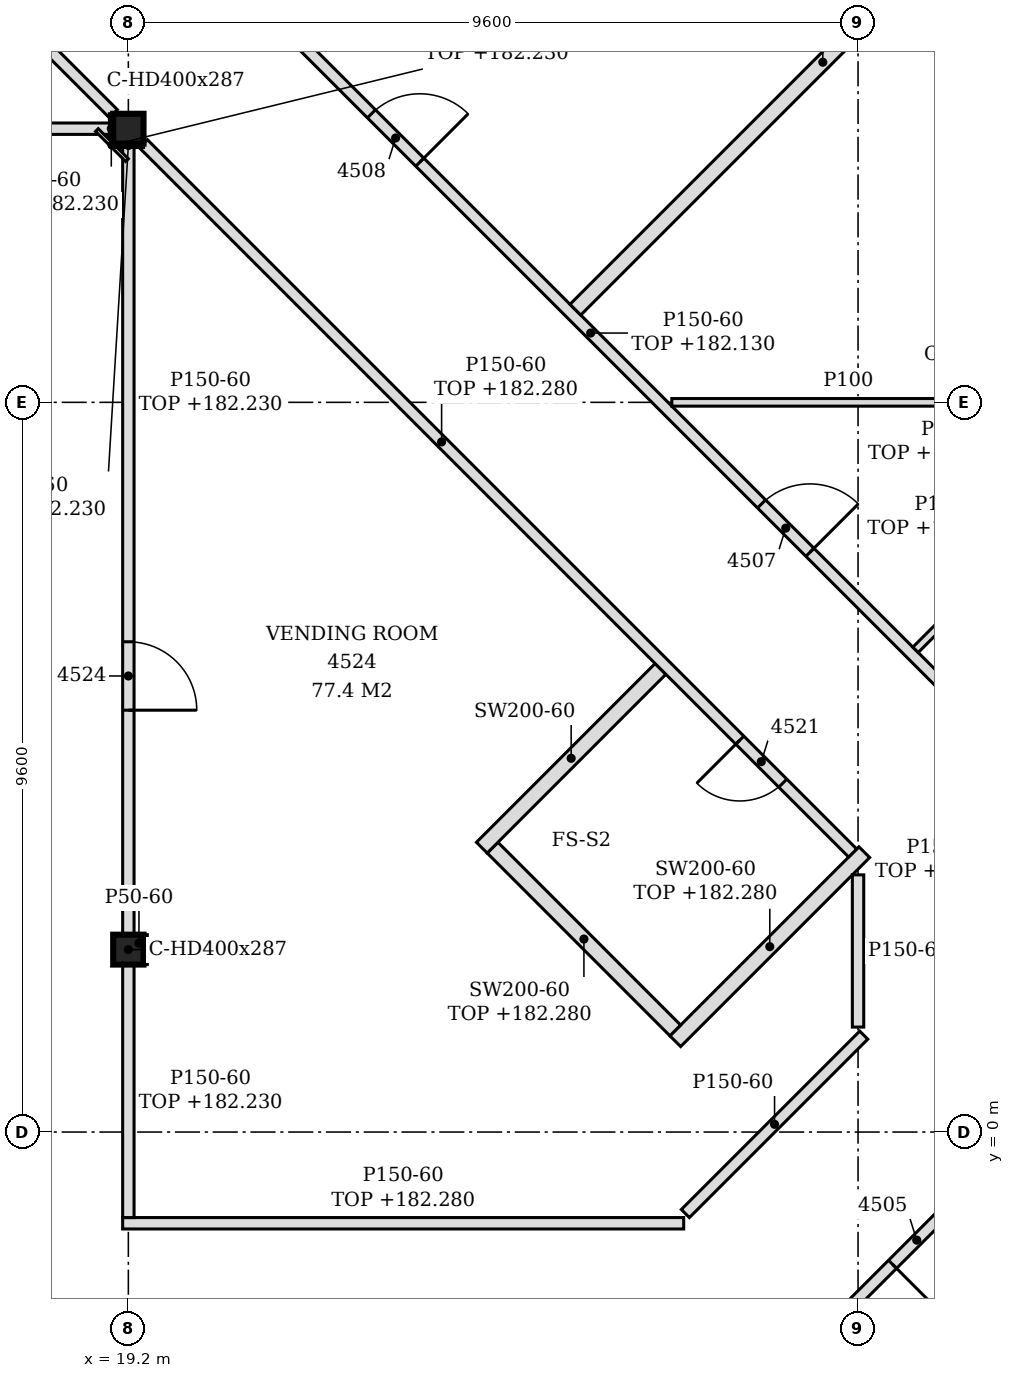
"""IFC4 building model, lengths in metres.
Left out: names, types, materials, properties, quantities, classifications, styles, units other than length and angle.
Written with IfcOpenShell. Run it as: python <this file> out.ifc"""

import sys

from ifc_helpers import new_model, si_unit, direction, frame, frame_2d, origin, origin_2d, place, context, subcontext, project, spatial, polyline, rectangle, i_section, outline, extrude, element, fill, save


model = new_model("IFC4")
c1 = context("Model", 3, precision=1e-05, world=origin(), true_north=direction((0.0, 1.0)))
c2 = subcontext(c1, "Body", "Model", "MODEL_VIEW")
j1 = project(units=[si_unit("LENGTHUNIT", "METRE"), si_unit("PLANEANGLEUNIT", "RADIAN")], contexts=[c1])
p1 = place(None, origin())
s1 = spatial("IfcSite", under=j1, at=p1, CompositionType="ELEMENT")
p2 = place(p1, origin())
s2 = spatial("IfcBuilding", under=s1, at=p2, CompositionType="ELEMENT")
p3 = place(p2, frame((0.0, 0.0, 179.4)))
s3 = spatial("IfcBuildingStorey", under=s2, at=p3, CompositionType="ELEMENT", Elevation=179.4)
for number, where, z_axis, x_axis in (
    (1, (19.2, 2.4, -0.15), (0.0, 0.0, 1.0), (1.0, 0.0, 0.0)),
    (2, (19.2, 13.2, -0.15), (0.0, 0.0, 1.0), (1.0, 0.0, 0.0)),
):
    element("IfcColumn", number, at=place(p3, frame(where, z_axis=z_axis, x_axis=x_axis)), inside=s3, PredefinedType="COLUMN", context=c2, shape_type="SweptSolid", body=[
        extrude(i_section(OverallWidth=0.399, OverallDepth=0.393, WebThickness=0.023, FlangeThickness=0.037, FilletRadius=0.015, at=origin_2d()), origin(), (0.0, 0.0, 1.0), 3.6),
    ])
p4 = place(p3, frame((20.297, -10.697, 0.0), z_axis=(0.0, 0.0, 1.0), x_axis=(0.707098631462, 0.707114930817, 0.0)))
e3 = element("IfcWall", 3, at=p4, inside=s3, PredefinedType="PARTITIONING", context=c2, shape_type="SweptSolid", body=[
    extrude(rectangle(XDim=14.979, YDim=0.15, at=frame_2d((7.489, 0.0))), origin(), (0.0, 0.0, 1.0), 2.88),
])
p5 = place(p4, frame((0.561, 0.0, 0.0)))
e4 = element("IfcOpeningElement", 4, at=p5, cuts=e3, PredefinedType="OPENING", context=c2, shape_type="SweptSolid", body=[
    extrude(rectangle(XDim=0.9, YDim=2.1, at=frame_2d((0.45, 1.05))), frame((0.0, 0.085, 0.0), z_axis=(0.0, -1.0, 0.0), x_axis=(1.0, 0.0, 0.0)), (0.0, 0.0, 1.0), 0.17),
])
p6 = place(p4, frame((4.986, 0.0, 0.0)))
e5 = element("IfcOpeningElement", 5, at=p6, cuts=e3, PredefinedType="OPENING", context=c2, shape_type="SweptSolid", body=[
    extrude(rectangle(XDim=0.9, YDim=2.1, at=frame_2d((0.45, 1.05))), frame((0.0, 0.085, 0.0), z_axis=(0.0, -1.0, 0.0), x_axis=(1.0, 0.0, 0.0)), (0.0, 0.0, 1.0), 0.17),
])
p7 = place(p4, frame((12.667, 0.0, 0.0)))
e6 = element("IfcOpeningElement", 6, at=p7, cuts=e3, PredefinedType="OPENING", context=c2, shape_type="SweptSolid", body=[
    extrude(rectangle(XDim=0.9, YDim=2.1, at=frame_2d((0.45, 1.05))), frame((0.0, 0.085, 0.0), z_axis=(0.0, -1.0, 0.0), x_axis=(1.0, 0.0, 0.0)), (0.0, 0.0, 1.0), 0.17),
])
p8 = place(p3, frame((19.125, -1.2, 0.0), z_axis=(0.0, 0.0, 1.0), x_axis=(1.0, 0.0, 0.0)))
e7 = element("IfcWall", 7, at=p8, inside=s3, PredefinedType="PARTITIONING", context=c2, shape_type="SweptSolid", body=[
    extrude(outline(polyline([(0.0, 0.0), (7.381, 0.0), (7.381, 2.88), (0.225, 2.88), (0.223, 2.83), (0.0, 2.83), (0.0, 0.0)])), frame((0.0, 0.075, 0.0), z_axis=(0.0, -1.0, 0.0), x_axis=(1.0, 0.0, 0.0)), (0.0, 0.0, 1.0), 0.15),
])
p9 = place(p3, frame((19.2, -1.125, 0.0), z_axis=(0.0, 0.0, 1.0), x_axis=(0.0, 1.0, 0.0)))
e8 = element("IfcWall", 8, at=p9, inside=s3, PredefinedType="PARTITIONING", context=c2, shape_type="SweptSolid", body=[
    extrude(rectangle(XDim=3.329, YDim=0.15, at=frame_2d((1.664, 0.0))), origin(), (0.0, 0.0, 1.0), 2.83),
])
p10 = place(p3, frame((26.528, -1.072, 0.0), z_axis=(0.0, 0.0, 1.0), x_axis=(0.707106781187, 0.707106781187, 0.0)))
e9 = element("IfcWall", 9, at=p10, inside=s3, PredefinedType="PARTITIONING", context=c2, shape_type="SweptSolid", body=[
    extrude(rectangle(XDim=3.319, YDim=0.15, at=frame_2d((1.66, 0.0))), origin(), (0.0, 0.0, 1.0), 3.45),
])
p11 = place(p3, frame((26.395, 1.195, 0.0), z_axis=(0.0, 0.0, 1.0), x_axis=(0.707106781187, 0.707106781187, 0.0)))
e10 = element("IfcWall", 10, at=p11, inside=s3, PredefinedType="PARTITIONING", context=c2, shape_type="SweptSolid", body=[
    extrude(rectangle(XDim=3.517, YDim=0.2, at=frame_2d((1.759, 0.0))), origin(), (0.0, 0.0, 1.0), 2.88),
])
p12 = place(p3, frame((26.395, 1.337, 0.0), z_axis=(0.0, 0.0, 1.0), x_axis=(-0.706963147882, 0.707250385321, 0.0)))
e11 = element("IfcWall", 11, at=p12, inside=s3, PredefinedType="PARTITIONING", context=c2, shape_type="SweptSolid", body=[
    extrude(rectangle(XDim=3.4, YDim=0.2, at=frame_2d((1.7, 0.0))), origin(), (0.0, 0.0, 1.0), 2.88),
])
p13 = place(p3, frame((28.8, 1.381, 0.0), z_axis=(0.0, 0.0, 1.0), x_axis=(0.0, 1.0, 0.0)))
e12 = element("IfcWall", 12, at=p13, inside=s3, PredefinedType="PARTITIONING", context=c2, shape_type="SweptSolid", body=[
    extrude(outline(polyline([(0.0, 0.0), (2.002, 0.0), (2.002, 2.88), (1.964, 2.88), (1.962, 3.45), (0.0, 3.45), (0.0, 0.0)])), frame((0.0, 0.075, 0.0), z_axis=(0.0, -1.0, 0.0), x_axis=(1.0, 0.0, 0.0)), (0.0, 0.0, 1.0), 0.15),
])
p14 = place(p3, frame((19.2, 2.596, 0.0), z_axis=(0.0, 0.0, 1.0), x_axis=(0.0, 1.0, 0.0)))
e13 = element("IfcWall", 13, at=p14, inside=s3, PredefinedType="PARTITIONING", context=c2, shape_type="SweptSolid", body=[
    extrude(rectangle(XDim=10.407, YDim=0.15, at=frame_2d((5.204, 0.0))), origin(), (0.0, 0.0, 1.0), 2.83),
])
p15 = place(p14, frame((2.954, 0.0, 0.0)))
e14 = element("IfcOpeningElement", 14, at=p15, cuts=e13, PredefinedType="OPENING", context=c2, shape_type="SweptSolid", body=[
    extrude(rectangle(XDim=0.9, YDim=2.1, at=frame_2d((0.45, 1.05))), frame((0.0, 0.085, 0.0), z_axis=(0.0, -1.0, 0.0), x_axis=(1.0, 0.0, 0.0)), (0.0, 0.0, 1.0), 0.17),
])
p16 = place(p3, frame((23.85, 3.741, 0.0), z_axis=(0.0, 0.0, 1.0), x_axis=(0.706923198159, 0.707290316563, 0.0)))
e15 = element("IfcWall", 15, at=p16, inside=s3, PredefinedType="PARTITIONING", context=c2, shape_type="SweptSolid", body=[
    extrude(rectangle(XDim=3.325, YDim=0.2, at=frame_2d((1.663, 0.0))), origin(), (0.0, 0.0, 1.0), 3.45),
])
p17 = place(p3, frame((28.729, 3.671, 0.0), z_axis=(0.0, 0.0, 1.0), x_axis=(-0.707106781187, 0.707106781187, 0.0)))
e16 = element("IfcWall", 16, at=p17, inside=s3, PredefinedType="PARTITIONING", context=c2, shape_type="SweptSolid", body=[
    extrude(rectangle(XDim=13.197, YDim=0.15, at=frame_2d((6.598, 0.0))), origin(), (0.0, 0.0, 1.0), 2.88),
])
p18 = place(p17, frame((1.3, 0.0, 0.0)))
e17 = element("IfcOpeningElement", 17, at=p18, cuts=e16, PredefinedType="OPENING", context=c2, shape_type="SweptSolid", body=[
    extrude(rectangle(XDim=0.8, YDim=2.1, at=frame_2d((0.4, 1.05))), frame((0.0, 0.085, 0.0), z_axis=(0.0, -1.0, 0.0), x_axis=(1.0, 0.0, 0.0)), (0.0, 0.0, 1.0), 0.17),
])
p19 = place(p3, frame((31.072, 4.722, 0.0), z_axis=(0.0, 0.0, 1.0), x_axis=(-0.707101007496, 0.70711255483, 0.0)))
e18 = element("IfcWall", 18, at=p19, inside=s3, PredefinedType="PARTITIONING", context=c2, shape_type="SweptSolid", body=[
    extrude(rectangle(XDim=21.143, YDim=0.15, at=frame_2d((10.571, 0.0))), origin(), (0.0, 0.0, 1.0), 2.73),
])
p20 = place(p19, frame((4.108, 0.0, 0.0)))
e19 = element("IfcOpeningElement", 19, at=p20, cuts=e18, PredefinedType="OPENING", context=c2, shape_type="SweptSolid", body=[
    extrude(rectangle(XDim=0.9, YDim=2.1, at=frame_2d((0.45, 1.05))), frame((0.0, 0.085, 0.0), z_axis=(0.0, -1.0, 0.0), x_axis=(1.0, 0.0, 0.0)), (0.0, 0.0, 1.0), 0.17),
])
p21 = place(p19, frame((11.367, 0.0, 0.0)))
e20 = element("IfcOpeningElement", 20, at=p21, cuts=e18, PredefinedType="OPENING", context=c2, shape_type="SweptSolid", body=[
    extrude(rectangle(XDim=0.9, YDim=2.1, at=frame_2d((0.45, 1.05))), frame((0.0, 0.085, 0.0), z_axis=(0.0, -1.0, 0.0), x_axis=(1.0, 0.0, 0.0)), (0.0, 0.0, 1.0), 0.17),
])
p22 = place(p19, frame((16.556, 0.0, 0.0)))
e21 = element("IfcOpeningElement", 21, at=p22, cuts=e18, PredefinedType="OPENING", context=c2, shape_type="SweptSolid", body=[
    extrude(rectangle(XDim=0.9, YDim=2.1, at=frame_2d((0.45, 1.05))), frame((0.0, 0.085, 0.0), z_axis=(0.0, -1.0, 0.0), x_axis=(1.0, 0.0, 0.0)), (0.0, 0.0, 1.0), 0.17),
])
p23 = place(p3, frame((29.556, 6.344, 0.0), z_axis=(0.0, 0.0, 1.0), x_axis=(0.707158179099, 0.707055379538, 0.0)))
e22 = element("IfcWall", 22, at=p23, inside=s3, PredefinedType="PARTITIONING", context=c2, shape_type="SweptSolid", body=[
    extrude(rectangle(XDim=2.375, YDim=0.1, at=frame_2d((1.188, 0.0))), origin(), (0.0, 0.0, 1.0), 2.93),
])
p24 = place(p3, frame((26.35, 9.6, 0.0), z_axis=(0.0, 0.0, 1.0), x_axis=(1.0, 0.0, 0.0)))
e23 = element("IfcWall", 23, at=p24, inside=s3, PredefinedType="PARTITIONING", context=c2, shape_type="SweptSolid", body=[
    extrude(rectangle(XDim=4.646, YDim=0.1, at=frame_2d((2.323, 0.0))), origin(), (0.0, 0.0, 1.0), 3.45),
])
p25 = place(p3, frame((25.081, 10.819, 0.0), z_axis=(0.0, 0.0, 1.0), x_axis=(0.707106781187, 0.707106781187, 0.0)))
e24 = element("IfcWall", 24, at=p25, inside=s3, PredefinedType="PARTITIONING", context=c2, shape_type="SweptSolid", body=[
    extrude(rectangle(XDim=9.208, YDim=0.2, at=frame_2d((4.604, 0.0))), origin(), (0.0, 0.0, 1.0), 2.88),
])
p26 = place(p3, frame((7.399, 13.2, 0.0), z_axis=(0.0, 0.0, 1.0), x_axis=(1.0, 0.0, 0.0)))
e25 = element("IfcWall", 25, at=p26, inside=s3, PredefinedType="PARTITIONING", context=c2, shape_type="SweptSolid", body=[
    extrude(rectangle(XDim=11.601, YDim=0.15, at=frame_2d((5.801, 0.0))), origin(), (0.0, 0.0, 1.0), 2.83),
])
p27 = place(p26, frame((5.351, 0.0, 0.0)))
e26 = element("IfcOpeningElement", 26, at=p27, cuts=e25, PredefinedType="OPENING", context=c2, shape_type="SweptSolid", body=[
    extrude(rectangle(XDim=0.9, YDim=2.1, at=frame_2d((0.45, 1.05))), frame((0.0, 0.085, 0.0), z_axis=(0.0, -1.0, 0.0), x_axis=(1.0, 0.0, 0.0)), (0.0, 0.0, 1.0), 0.17),
])
p28 = place(p3, frame((19.002, 13.398, 0.0), z_axis=(0.0, 0.0, 1.0), x_axis=(-0.707106781187, 0.707106781187, 0.0)))
e27 = element("IfcWall", 27, at=p28, inside=s3, PredefinedType="PARTITIONING", context=c2, shape_type="SweptSolid", body=[
    extrude(rectangle(XDim=5.479, YDim=0.15, at=frame_2d((2.739, 0.0))), origin(), (0.0, 0.0, 1.0), 3.45),
])
p29 = place(p3, frame((19.425, 2.204, 0.0), z_axis=(0.0, 0.0, 1.0), x_axis=(0.0, 1.0, 0.0)))
e28 = element("IfcWall", 28, at=p29, inside=s3, PredefinedType="PARTITIONING", context=c2, shape_type="SweptSolid", body=[
    extrude(rectangle(XDim=0.393, YDim=0.05, at=frame_2d((0.196, 0.0))), origin(), (0.0, 0.0, 1.0), 3.45),
])
p30 = place(p3, frame((18.976, 13.003, 0.0), z_axis=(0.0, 0.0, 1.0), x_axis=(0.0, 1.0, 0.0)))
e29 = element("IfcWall", 29, at=p30, inside=s3, PredefinedType="PARTITIONING", context=c2, shape_type="SweptSolid", body=[
    extrude(rectangle(XDim=0.393, YDim=0.05, at=frame_2d((0.197, 0.0))), origin(), (0.0, 0.0, 1.0), 2.83),
])
p31 = place(p3, frame((19.182, 12.786, 0.0), z_axis=(0.0, 0.0, 1.0), x_axis=(-0.707106781187, 0.707106781187, 0.0)))
e30 = element("IfcWall", 30, at=p31, inside=s3, PredefinedType="PARTITIONING", context=c2, shape_type="SweptSolid", body=[
    extrude(rectangle(XDim=0.56, YDim=0.05, at=frame_2d((0.28, 0.0))), origin(), (0.0, 0.0, 1.0), 2.83),
])
p32 = place(p3, frame((19.0, 12.979, 0.0), z_axis=(0.0, 0.0, 1.0), x_axis=(1.0, 0.0, 0.0)))
e31 = element("IfcWall", 31, at=p32, inside=s3, PredefinedType="PARTITIONING", context=c2, shape_type="SweptSolid", body=[
    extrude(rectangle(XDim=0.399, YDim=0.05, at=frame_2d((0.199, 0.0))), origin(), (0.0, 0.0, 1.0), 2.83),
])
p33 = place(p7, frame((0.9, 0.0, 0.0), z_axis=(0.0, 0.0, 1.0), x_axis=(-1.0, 0.0, 0.0)))
e32 = element("IfcDoor", 32, at=p33, inside=s3, OperationType="SINGLE_SWING_RIGHT", PredefinedType="DOOR", context=c2, shape_type="SweptSolid", body=[
    extrude(rectangle(XDim=0.9, YDim=2.1, at=frame_2d((0.45, 1.05))), frame((0.0, 0.025, 0.0), z_axis=(0.0, -1.0, 0.0), x_axis=(1.0, 0.0, 0.0)), (0.0, 0.0, 1.0), 0.05),
])
fill(e6, e32)
p34 = place(p20, frame((0.9, 0.0, 0.0), z_axis=(0.0, 0.0, 1.0), x_axis=(-1.0, 0.0, 0.0)))
e33 = element("IfcDoor", 33, at=p34, inside=s3, OperationType="SINGLE_SWING_RIGHT", PredefinedType="DOOR", context=c2, shape_type="SweptSolid", body=[
    extrude(rectangle(XDim=0.9, YDim=2.1, at=frame_2d((0.45, 1.05))), frame((0.0, 0.025, 0.0), z_axis=(0.0, -1.0, 0.0), x_axis=(1.0, 0.0, 0.0)), (0.0, 0.0, 1.0), 0.05),
])
fill(e19, e33)
p35 = place(p21, frame((0.9, 0.0, 0.0), z_axis=(0.0, 0.0, 1.0), x_axis=(-1.0, 0.0, 0.0)))
e34 = element("IfcDoor", 34, at=p35, inside=s3, OperationType="SINGLE_SWING_RIGHT", PredefinedType="DOOR", context=c2, shape_type="SweptSolid", body=[
    extrude(rectangle(XDim=0.9, YDim=2.1, at=frame_2d((0.45, 1.05))), frame((0.0, 0.025, 0.0), z_axis=(0.0, -1.0, 0.0), x_axis=(1.0, 0.0, 0.0)), (0.0, 0.0, 1.0), 0.05),
])
fill(e20, e34)
p36 = place(p18, origin())
e35 = element("IfcDoor", 35, at=p36, inside=s3, OperationType="SINGLE_SWING_RIGHT", PredefinedType="DOOR", context=c2, shape_type="SweptSolid", body=[
    extrude(rectangle(XDim=0.8, YDim=2.1, at=frame_2d((0.4, 1.05))), frame((0.0, 0.025, 0.0), z_axis=(0.0, -1.0, 0.0), x_axis=(1.0, 0.0, 0.0)), (0.0, 0.0, 1.0), 0.05),
])
fill(e17, e35)
p37 = place(p15, frame((0.9, 0.0, 0.0), z_axis=(0.0, 0.0, 1.0), x_axis=(-1.0, 0.0, 0.0)))
e36 = element("IfcDoor", 36, at=p37, inside=s3, OperationType="SINGLE_SWING_RIGHT", PredefinedType="DOOR", context=c2, shape_type="SweptSolid", body=[
    extrude(rectangle(XDim=0.9, YDim=2.1, at=frame_2d((0.45, 1.05))), frame((0.0, 0.025, 0.0), z_axis=(0.0, -1.0, 0.0), x_axis=(1.0, 0.0, 0.0)), (0.0, 0.0, 1.0), 0.05),
])
fill(e14, e36)
save(model, sys.argv[1])
